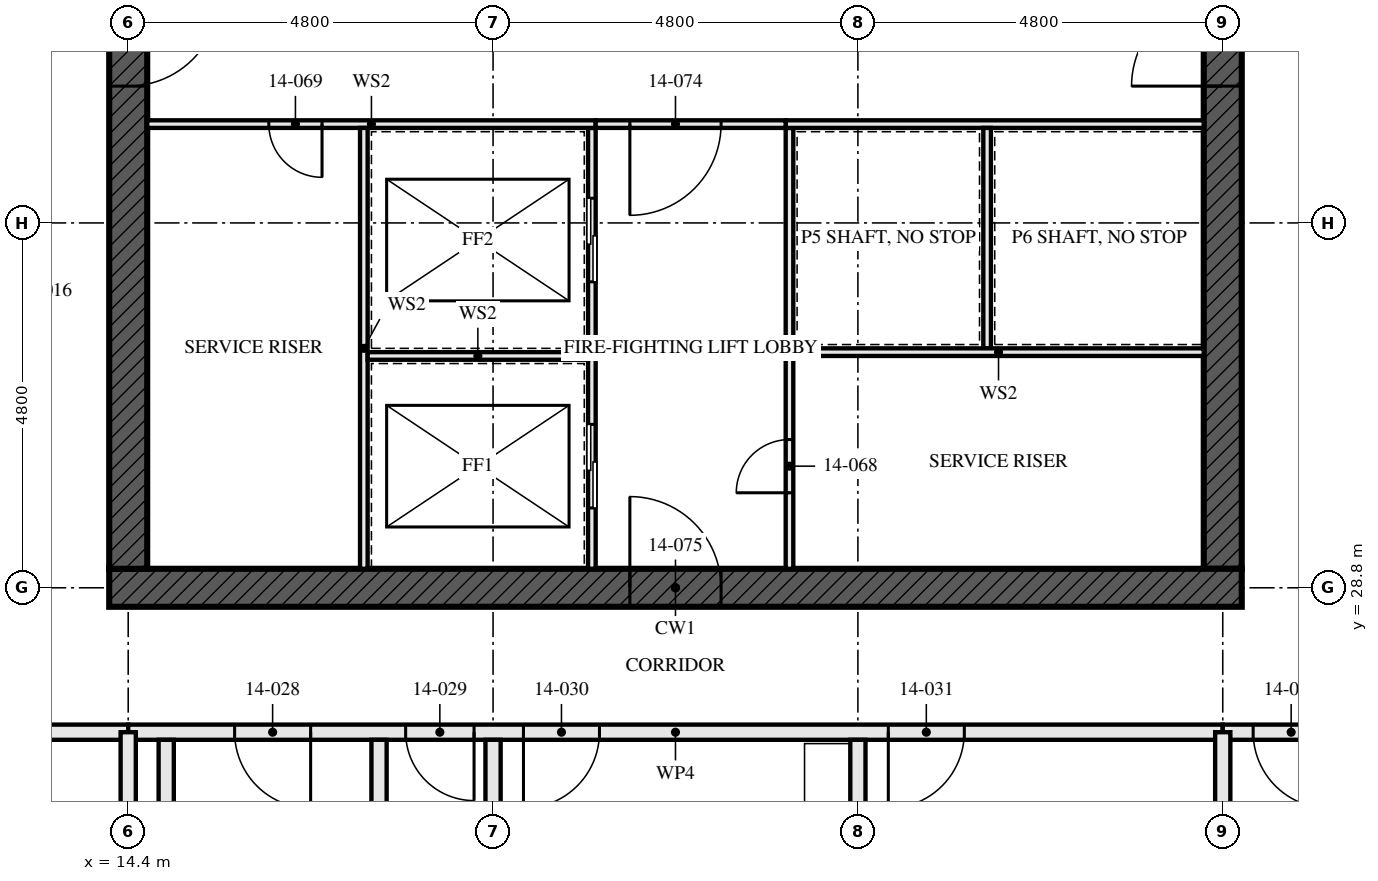
"""IFC4 building model, lengths in metres.
Left out: names, types, materials, properties, quantities, classifications, styles, units other than length and angle.
Written with IfcOpenShell. Run it as: python <this file> out.ifc"""

import sys

from ifc_helpers import new_model, si_unit, direction, frame, frame_2d, origin, place, context, subcontext, project, spatial, rectangle, extrude, element, fill, save


model = new_model("IFC4")
c1 = context("Model", 3, precision=1e-05, world=origin(), true_north=direction((0.0, 1.0)))
c2 = subcontext(c1, "Body", "Model", "MODEL_VIEW")
j1 = project(units=[si_unit("LENGTHUNIT", "METRE"), si_unit("PLANEANGLEUNIT", "RADIAN")], contexts=[c1])
p1 = place(None, origin())
s1 = spatial("IfcSite", under=j1, at=p1, CompositionType="ELEMENT")
p2 = place(p1, origin())
s2 = spatial("IfcBuilding", under=s1, at=p2, CompositionType="ELEMENT")
p3 = place(p2, frame((0.0, 0.0, 55.0)))
s3 = spatial("IfcBuildingStorey", under=s2, at=p3, CompositionType="ELEMENT", Elevation=55.0)
p4 = place(p3, frame((14.15, 28.8, -0.17), z_axis=(0.0, 0.0, 1.0), x_axis=(1.0, 0.0, 0.0)))
e1 = element("IfcWall", 1, at=p4, inside=s3, PredefinedType="SHEAR", context=c2, shape_type="SweptSolid", body=[
    extrude(rectangle(XDim=14.9, YDim=0.5, at=frame_2d((7.45, 0.0))), origin(), (0.0, 0.0, 1.0), 3.5),
])
p5 = place(p4, frame((6.85, 0.0, 0.17)))
e2 = element("IfcOpeningElement", 2, at=p5, cuts=e1, PredefinedType="OPENING", context=c2, shape_type="SweptSolid", body=[
    extrude(rectangle(XDim=1.2, YDim=2.1, at=frame_2d((0.6, 1.05))), frame((0.0, 0.26, 0.0), z_axis=(0.0, -1.0, 0.0), x_axis=(1.0, 0.0, 0.0)), (0.0, 0.0, 1.0), 0.521),
])
p6 = place(p3, frame((14.4, 42.95, -0.17), z_axis=(0.0, 0.0, 1.0), x_axis=(0.0, -1.0, 0.0)))
e3 = element("IfcWall", 3, at=p6, inside=s3, PredefinedType="SHEAR", context=c2, shape_type="SweptSolid", body=[
    extrude(rectangle(XDim=13.9, YDim=0.5, at=frame_2d((6.95, 0.0))), origin(), (0.0, 0.0, 1.0), 3.5),
])
p7 = place(p6, frame((6.35, 0.0, 0.17)))
e4 = element("IfcOpeningElement", 4, at=p7, cuts=e3, PredefinedType="OPENING", context=c2, shape_type="SweptSolid", body=[
    extrude(rectangle(XDim=1.2, YDim=2.1, at=frame_2d((0.6, 1.05))), frame((0.0, 0.26, 0.0), z_axis=(0.0, -1.0, 0.0), x_axis=(1.0, 0.0, 0.0)), (0.0, 0.0, 1.0), 0.521),
])
p8 = place(p3, frame((28.8, 29.05, -0.17), z_axis=(0.0, 0.0, 1.0), x_axis=(0.0, 1.0, 0.0)))
e5 = element("IfcWall", 5, at=p8, inside=s3, PredefinedType="SHEAR", context=c2, shape_type="SweptSolid", body=[
    extrude(rectangle(XDim=13.9, YDim=0.5, at=frame_2d((6.95, 0.0))), origin(), (0.0, 0.0, 1.0), 3.5),
])
p9 = place(p8, frame((6.35, 0.0, 0.17)))
e6 = element("IfcOpeningElement", 6, at=p9, cuts=e5, PredefinedType="OPENING", context=c2, shape_type="SweptSolid", body=[
    extrude(rectangle(XDim=1.2, YDim=2.1, at=frame_2d((0.6, 1.05))), frame((0.0, 0.26, 0.0), z_axis=(0.0, -1.0, 0.0), x_axis=(1.0, 0.0, 0.0)), (0.0, 0.0, 1.0), 0.521),
])
p10 = place(p3, frame((4.8, 26.9, 0.0), z_axis=(0.0, 0.0, 1.0), x_axis=(1.0, 0.0, 0.0)))
e7 = element("IfcWall", 7, at=p10, inside=s3, PredefinedType="PARTITIONING", context=c2, shape_type="SweptSolid", body=[
    extrude(rectangle(XDim=9.6, YDim=0.2, at=frame_2d((4.8, 0.0))), origin(), (0.0, 0.0, 1.0), 3.33),
])
p11 = place(p10, frame((0.4, 0.0, 0.0)))
e8 = element("IfcOpeningElement", 8, at=p11, cuts=e7, PredefinedType="OPENING", context=c2, shape_type="SweptSolid", body=[
    extrude(rectangle(XDim=1.0, YDim=2.1, at=frame_2d((0.5, 1.05))), frame((0.0, 0.111, 0.0), z_axis=(0.0, -1.0, 0.0), x_axis=(1.0, 0.0, 0.0)), (0.0, 0.0, 1.0), 0.221),
])
for number, where, z_axis, x_axis in (
    (9, (14.9, 22.1, 0.0), (0.0, 0.0, 1.0), (0.0, 1.0, 0.0)),
    (10, (17.7, 22.1, 0.0), (0.0, 0.0, 1.0), (0.0, 1.0, 0.0)),
):
    element("IfcWall", number, at=place(p3, frame(where, z_axis=z_axis, x_axis=x_axis)), inside=s3, PredefinedType="SOLIDWALL", context=c2, shape_type="SweptSolid", body=[
        extrude(rectangle(XDim=4.7, YDim=0.2, at=frame_2d((2.35, 0.0))), origin(), (0.0, 0.0, 1.0), 2.99),
    ])
for number, where, z_axis, x_axis in (
    (11, (19.2, 14.795, 0.0), (0.0, 0.0, 1.0), (0.0, 1.0, 0.0)),
    (12, (24.0, 14.795, 0.0), (0.0, 0.0, 1.0), (0.0, 1.0, 0.0)),
):
    element("IfcWall", number, at=place(p3, frame(where, z_axis=z_axis, x_axis=x_axis)), inside=s3, PredefinedType="PARTITIONING", context=c2, shape_type="SweptSolid", body=[
        extrude(rectangle(XDim=12.005, YDim=0.2, at=frame_2d((6.002, 0.0))), origin(), (0.0, 0.0, 1.0), 2.55),
    ])
p12 = place(p3, frame((14.4, 26.9, 0.0), z_axis=(0.0, 0.0, 1.0), x_axis=(1.0, 0.0, 0.0)))
e13 = element("IfcWall", 13, at=p12, inside=s3, PredefinedType="PARTITIONING", context=c2, shape_type="SweptSolid", body=[
    extrude(rectangle(XDim=14.4, YDim=0.2, at=frame_2d((7.2, 0.0))), origin(), (0.0, 0.0, 1.0), 2.55),
])
p13 = place(p12, frame((1.4, 0.0, 0.0)))
e14 = element("IfcOpeningElement", 14, at=p13, cuts=e13, PredefinedType="OPENING", context=c2, shape_type="SweptSolid", body=[
    extrude(rectangle(XDim=1.0, YDim=2.1, at=frame_2d((0.5, 1.05))), frame((0.0, 0.111, 0.0), z_axis=(0.0, -1.0, 0.0), x_axis=(1.0, 0.0, 0.0)), (0.0, 0.0, 1.0), 0.221),
])
p14 = place(p12, frame((3.65, 0.0, 0.0)))
e15 = element("IfcOpeningElement", 15, at=p14, cuts=e13, PredefinedType="OPENING", context=c2, shape_type="SweptSolid", body=[
    extrude(rectangle(XDim=0.9, YDim=2.1, at=frame_2d((0.45, 1.05))), frame((0.0, 0.111, 0.0), z_axis=(0.0, -1.0, 0.0), x_axis=(1.0, 0.0, 0.0)), (0.0, 0.0, 1.0), 0.221),
])
p15 = place(p12, frame((5.2, 0.0, 0.0)))
e16 = element("IfcOpeningElement", 16, at=p15, cuts=e13, PredefinedType="OPENING", context=c2, shape_type="SweptSolid", body=[
    extrude(rectangle(XDim=1.0, YDim=2.1, at=frame_2d((0.5, 1.05))), frame((0.0, 0.111, 0.0), z_axis=(0.0, -1.0, 0.0), x_axis=(1.0, 0.0, 0.0)), (0.0, 0.0, 1.0), 0.221),
])
p16 = place(p12, frame((10.0, 0.0, 0.0)))
e17 = element("IfcOpeningElement", 17, at=p16, cuts=e13, PredefinedType="OPENING", context=c2, shape_type="SweptSolid", body=[
    extrude(rectangle(XDim=1.0, YDim=2.1, at=frame_2d((0.5, 1.05))), frame((0.0, 0.111, 0.0), z_axis=(0.0, -1.0, 0.0), x_axis=(1.0, 0.0, 0.0)), (0.0, 0.0, 1.0), 0.221),
])
p17 = place(p3, frame((28.8, 26.9, 0.0), z_axis=(0.0, 0.0, 1.0), x_axis=(1.0, 0.0, 0.0)))
e18 = element("IfcWall", 18, at=p17, inside=s3, PredefinedType="PARTITIONING", context=c2, shape_type="SweptSolid", body=[
    extrude(rectangle(XDim=9.6, YDim=0.2, at=frame_2d((4.8, 0.0))), origin(), (0.0, 0.0, 1.0), 3.33),
])
p18 = place(p17, frame((0.4, 0.0, 0.0)))
e19 = element("IfcOpeningElement", 19, at=p18, cuts=e18, PredefinedType="OPENING", context=c2, shape_type="SweptSolid", body=[
    extrude(rectangle(XDim=1.0, YDim=2.1, at=frame_2d((0.5, 1.05))), frame((0.0, 0.111, 0.0), z_axis=(0.0, -1.0, 0.0), x_axis=(1.0, 0.0, 0.0)), (0.0, 0.0, 1.0), 0.221),
])
p19 = place(p3, frame((20.5, 29.05, 0.0), z_axis=(0.0, 0.0, 1.0), x_axis=(0.0, 1.0, 0.0)))
e20 = element("IfcWall", 20, at=p19, inside=s3, PredefinedType="SOLIDWALL", context=c2, shape_type="SweptSolid", body=[
    extrude(rectangle(XDim=5.8, YDim=0.1, at=frame_2d((2.9, 0.0))), origin(), (0.0, 0.0, 1.0), 3.33),
])
p20 = place(p19, frame((0.8, 0.0, 0.0)))
e21 = element("IfcOpeningElement", 21, at=p20, cuts=e20, PredefinedType="OPENING", context=c2, shape_type="SweptSolid", body=[
    extrude(rectangle(XDim=1.1, YDim=2.3, at=frame_2d((0.55, 1.15))), frame((0.0, 0.061, 0.0), z_axis=(0.0, -1.0, 0.0), x_axis=(1.0, 0.0, 0.0)), (0.0, 0.0, 1.0), 0.121),
])
p21 = place(p19, frame((3.775, 0.0, 0.0)))
e22 = element("IfcOpeningElement", 22, at=p21, cuts=e20, PredefinedType="OPENING", context=c2, shape_type="SweptSolid", body=[
    extrude(rectangle(XDim=1.1, YDim=2.3, at=frame_2d((0.55, 1.15))), frame((0.0, 0.061, 0.0), z_axis=(0.0, -1.0, 0.0), x_axis=(1.0, 0.0, 0.0)), (0.0, 0.0, 1.0), 0.121),
])
p22 = place(p3, frame((23.1, 29.05, 0.0), z_axis=(0.0, 0.0, 1.0), x_axis=(0.0, 1.0, 0.0)))
e23 = element("IfcWall", 23, at=p22, inside=s3, PredefinedType="SOLIDWALL", context=c2, shape_type="SweptSolid", body=[
    extrude(rectangle(XDim=5.8, YDim=0.1, at=frame_2d((2.9, 0.0))), origin(), (0.0, 0.0, 1.0), 3.33),
])
p23 = place(p22, frame((1.0, 0.0, 0.0)))
e24 = element("IfcOpeningElement", 24, at=p23, cuts=e23, PredefinedType="OPENING", context=c2, shape_type="SweptSolid", body=[
    extrude(rectangle(XDim=0.7, YDim=2.1, at=frame_2d((0.35, 1.05))), frame((0.0, 0.061, 0.0), z_axis=(0.0, -1.0, 0.0), x_axis=(1.0, 0.0, 0.0)), (0.0, 0.0, 1.0), 0.121),
])
p24 = place(p3, frame((14.65, 34.9, 0.0), z_axis=(0.0, 0.0, 1.0), x_axis=(1.0, 0.0, 0.0)))
e25 = element("IfcWall", 25, at=p24, inside=s3, PredefinedType="SOLIDWALL", context=c2, shape_type="SweptSolid", body=[
    extrude(rectangle(XDim=5.9, YDim=0.1, at=frame_2d((2.95, 0.0))), origin(), (0.0, 0.0, 1.0), 3.33),
])
p25 = place(p24, frame((1.6, 0.0, 0.0)))
e26 = element("IfcOpeningElement", 26, at=p25, cuts=e25, PredefinedType="OPENING", context=c2, shape_type="SweptSolid", body=[
    extrude(rectangle(XDim=0.7, YDim=2.1, at=frame_2d((0.35, 1.05))), frame((0.0, 0.061, 0.0), z_axis=(0.0, -1.0, 0.0), x_axis=(1.0, 0.0, 0.0)), (0.0, 0.0, 1.0), 0.121),
])
p26 = place(p3, frame((23.05, 34.9, 0.0), z_axis=(0.0, 0.0, 1.0), x_axis=(1.0, 0.0, 0.0)))
e27 = element("IfcWall", 27, at=p26, inside=s3, PredefinedType="SOLIDWALL", context=c2, shape_type="SweptSolid", body=[
    extrude(rectangle(XDim=5.5, YDim=0.1, at=frame_2d((2.75, 0.0))), origin(), (0.0, 0.0, 1.0), 3.33),
])
p27 = place(p3, frame((20.55, 34.9, 0.0), z_axis=(0.0, 0.0, 1.0), x_axis=(1.0, 0.0, 0.0)))
e28 = element("IfcWall", 28, at=p27, inside=s3, PredefinedType="SOLIDWALL", context=c2, shape_type="SweptSolid", body=[
    extrude(rectangle(XDim=2.5, YDim=0.1, at=frame_2d((1.25, 0.0))), origin(), (0.0, 0.0, 1.0), 3.33),
])
p28 = place(p27, frame((0.45, 0.0, 0.0)))
e29 = element("IfcOpeningElement", 29, at=p28, cuts=e28, PredefinedType="OPENING", context=c2, shape_type="SweptSolid", body=[
    extrude(rectangle(XDim=1.2, YDim=2.1, at=frame_2d((0.6, 1.05))), frame((0.0, 0.061, 0.0), z_axis=(0.0, -1.0, 0.0), x_axis=(1.0, 0.0, 0.0)), (0.0, 0.0, 1.0), 0.121),
])
p29 = place(p3, frame((17.5, 29.05, 0.0), z_axis=(0.0, 0.0, 1.0), x_axis=(0.0, 1.0, 0.0)))
e30 = element("IfcWall", 30, at=p29, inside=s3, PredefinedType="SOLIDWALL", context=c2, shape_type="SweptSolid", body=[
    extrude(rectangle(XDim=5.8, YDim=0.1, at=frame_2d((2.9, 0.0))), origin(), (0.0, 0.0, 1.0), 3.33),
])
p30 = place(p3, frame((17.55, 31.85, 0.0), z_axis=(0.0, 0.0, 1.0), x_axis=(1.0, 0.0, 0.0)))
e31 = element("IfcWall", 31, at=p30, inside=s3, PredefinedType="SOLIDWALL", context=c2, shape_type="SweptSolid", body=[
    extrude(rectangle(XDim=2.9, YDim=0.1, at=frame_2d((1.45, 0.0))), origin(), (0.0, 0.0, 1.0), 3.33),
])
p31 = place(p3, frame((25.7, 31.95, 0.0), z_axis=(0.0, 0.0, 1.0), x_axis=(0.0, 1.0, 0.0)))
e32 = element("IfcWall", 32, at=p31, inside=s3, PredefinedType="SOLIDWALL", context=c2, shape_type="SweptSolid", body=[
    extrude(rectangle(XDim=2.9, YDim=0.1, at=frame_2d((1.45, 0.0))), origin(), (0.0, 0.0, 1.0), 3.33),
])
p32 = place(p3, frame((23.15, 31.9, 0.0), z_axis=(0.0, 0.0, 1.0), x_axis=(1.0, 0.0, 0.0)))
e33 = element("IfcWall", 33, at=p32, inside=s3, PredefinedType="SOLIDWALL", context=c2, shape_type="SweptSolid", body=[
    extrude(rectangle(XDim=5.4, YDim=0.1, at=frame_2d((2.7, 0.0))), origin(), (0.0, 0.0, 1.0), 3.33),
])
for number, where, z_axis, x_axis in (
    (34, (14.4, 24.395, 0.0), (0.0, 0.0, 1.0), (0.0, 1.0, 0.0)),
    (35, (28.8, 24.395, 0.0), (0.0, 0.0, 1.0), (0.0, 1.0, 0.0)),
):
    element("IfcWall", number, at=place(p3, frame(where, z_axis=z_axis, x_axis=x_axis)), inside=s3, PredefinedType="PARTITIONING", context=c2, shape_type="SweptSolid", body=[
        extrude(rectangle(XDim=2.505, YDim=0.2, at=frame_2d((1.252, 0.0))), origin(), (0.0, 0.0, 1.0), 2.32),
    ])
p33 = place(p13, frame((1.0, 0.0, 0.0), z_axis=(0.0, 0.0, 1.0), x_axis=(-1.0, 0.0, 0.0)))
e36 = element("IfcDoor", 36, at=p33, inside=s3, OperationType="SINGLE_SWING_RIGHT", PredefinedType="DOOR", context=c2, shape_type="SweptSolid", body=[
    extrude(rectangle(XDim=1.0, YDim=2.1, at=frame_2d((0.5, 1.05))), frame((0.0, 0.032, 0.0), z_axis=(0.0, -1.0, 0.0), x_axis=(1.0, 0.0, 0.0)), (0.0, 0.0, 1.0), 0.064),
])
fill(e14, e36)
p34 = place(p14, frame((0.9, 0.0, 0.0), z_axis=(0.0, 0.0, 1.0), x_axis=(-1.0, 0.0, 0.0)))
e37 = element("IfcDoor", 37, at=p34, inside=s3, OperationType="SINGLE_SWING_RIGHT", PredefinedType="DOOR", context=c2, shape_type="SweptSolid", body=[
    extrude(rectangle(XDim=0.9, YDim=2.1, at=frame_2d((0.45, 1.05))), frame((0.0, 0.027, 0.0), z_axis=(0.0, -1.0, 0.0), x_axis=(1.0, 0.0, 0.0)), (0.0, 0.0, 1.0), 0.054),
])
fill(e15, e37)
p35 = place(p15, frame((1.0, 0.0, 0.0), z_axis=(0.0, 0.0, 1.0), x_axis=(-1.0, 0.0, 0.0)))
e38 = element("IfcDoor", 38, at=p35, inside=s3, OperationType="SINGLE_SWING_LEFT", PredefinedType="DOOR", context=c2, shape_type="SweptSolid", body=[
    extrude(rectangle(XDim=1.0, YDim=2.1, at=frame_2d((0.5, 1.05))), frame((0.0, 0.027, 0.0), z_axis=(0.0, -1.0, 0.0), x_axis=(1.0, 0.0, 0.0)), (0.0, 0.0, 1.0), 0.054),
])
fill(e16, e38)
p36 = place(p16, frame((1.0, 0.0, 0.0), z_axis=(0.0, 0.0, 1.0), x_axis=(-1.0, 0.0, 0.0)))
e39 = element("IfcDoor", 39, at=p36, inside=s3, OperationType="SINGLE_SWING_LEFT", PredefinedType="DOOR", context=c2, shape_type="SweptSolid", body=[
    extrude(rectangle(XDim=1.0, YDim=2.1, at=frame_2d((0.5, 1.05))), frame((0.0, 0.027, 0.0), z_axis=(0.0, -1.0, 0.0), x_axis=(1.0, 0.0, 0.0)), (0.0, 0.0, 1.0), 0.054),
])
fill(e17, e39)
p37 = place(p18, frame((1.0, 0.0, 0.0), z_axis=(0.0, 0.0, 1.0), x_axis=(-1.0, 0.0, 0.0)))
e40 = element("IfcDoor", 40, at=p37, inside=s3, OperationType="SINGLE_SWING_RIGHT", PredefinedType="DOOR", context=c2, shape_type="SweptSolid", body=[
    extrude(rectangle(XDim=1.0, YDim=2.1, at=frame_2d((0.5, 1.05))), frame((0.0, 0.027, 0.0), z_axis=(0.0, -1.0, 0.0), x_axis=(1.0, 0.0, 0.0)), (0.0, 0.0, 1.0), 0.054),
])
fill(e19, e40)
p38 = place(p20, origin())
e41 = element("IfcDoor", 41, at=p38, inside=s3, OperationType="SLIDING_TO_LEFT", PredefinedType="DOOR", context=c2, shape_type="SweptSolid", body=[
    extrude(rectangle(XDim=1.1, YDim=2.3, at=frame_2d((0.55, 1.15))), frame((0.0, 0.05, 0.0), z_axis=(0.0, -1.0, 0.0), x_axis=(1.0, 0.0, 0.0)), (0.0, 0.0, 1.0), 0.1),
])
fill(e21, e41)
p39 = place(p21, origin())
e42 = element("IfcDoor", 42, at=p39, inside=s3, OperationType="SLIDING_TO_LEFT", PredefinedType="DOOR", context=c2, shape_type="SweptSolid", body=[
    extrude(rectangle(XDim=1.1, YDim=2.3, at=frame_2d((0.55, 1.15))), frame((0.0, 0.05, 0.0), z_axis=(0.0, -1.0, 0.0), x_axis=(1.0, 0.0, 0.0)), (0.0, 0.0, 1.0), 0.1),
])
fill(e22, e42)
p40 = place(p23, origin())
e43 = element("IfcDoor", 43, at=p40, inside=s3, OperationType="SINGLE_SWING_RIGHT", PredefinedType="DOOR", context=c2, shape_type="SweptSolid", body=[
    extrude(rectangle(XDim=0.7, YDim=2.1, at=frame_2d((0.35, 1.05))), frame((0.0, 0.027, 0.0), z_axis=(0.0, -1.0, 0.0), x_axis=(1.0, 0.0, 0.0)), (0.0, 0.0, 1.0), 0.054),
])
fill(e24, e43)
p41 = place(p25, frame((0.7, 0.0, 0.0), z_axis=(0.0, 0.0, 1.0), x_axis=(-1.0, 0.0, 0.0)))
e44 = element("IfcDoor", 44, at=p41, inside=s3, OperationType="SINGLE_SWING_RIGHT", PredefinedType="DOOR", context=c2, shape_type="SweptSolid", body=[
    extrude(rectangle(XDim=0.7, YDim=2.1, at=frame_2d((0.35, 1.05))), frame((0.0, 0.027, 0.0), z_axis=(0.0, -1.0, 0.0), x_axis=(1.0, 0.0, 0.0)), (0.0, 0.0, 1.0), 0.054),
])
fill(e26, e44)
p42 = place(p28, frame((1.2, 0.0, 0.0), z_axis=(0.0, 0.0, 1.0), x_axis=(-1.0, 0.0, 0.0)))
e45 = element("IfcDoor", 45, at=p42, inside=s3, OperationType="SINGLE_SWING_LEFT", PredefinedType="DOOR", context=c2, shape_type="SweptSolid", body=[
    extrude(rectangle(XDim=1.2, YDim=2.1, at=frame_2d((0.6, 1.05))), frame((0.0, 0.027, 0.0), z_axis=(0.0, -1.0, 0.0), x_axis=(1.0, 0.0, 0.0)), (0.0, 0.0, 1.0), 0.054),
])
fill(e29, e45)
p43 = place(p5, origin())
e46 = element("IfcDoor", 46, at=p43, inside=s3, OperationType="SINGLE_SWING_LEFT", PredefinedType="DOOR", context=c2, shape_type="SweptSolid", body=[
    extrude(rectangle(XDim=1.2, YDim=2.1, at=frame_2d((0.6, 1.05))), frame((0.0, 0.027, 0.0), z_axis=(0.0, -1.0, 0.0), x_axis=(1.0, 0.0, 0.0)), (0.0, 0.0, 1.0), 0.054),
])
fill(e2, e46)
p44 = place(p7, origin())
e47 = element("IfcDoor", 47, at=p44, inside=s3, OperationType="SINGLE_SWING_LEFT", PredefinedType="DOOR", context=c2, shape_type="SweptSolid", body=[
    extrude(rectangle(XDim=1.2, YDim=2.1, at=frame_2d((0.6, 1.05))), frame((0.0, 0.027, 0.0), z_axis=(0.0, -1.0, 0.0), x_axis=(1.0, 0.0, 0.0)), (0.0, 0.0, 1.0), 0.054),
])
fill(e4, e47)
p45 = place(p9, origin())
e48 = element("IfcDoor", 48, at=p45, inside=s3, OperationType="SINGLE_SWING_LEFT", PredefinedType="DOOR", context=c2, shape_type="SweptSolid", body=[
    extrude(rectangle(XDim=1.2, YDim=2.1, at=frame_2d((0.6, 1.05))), frame((0.0, 0.027, 0.0), z_axis=(0.0, -1.0, 0.0), x_axis=(1.0, 0.0, 0.0)), (0.0, 0.0, 1.0), 0.054),
])
fill(e6, e48)
save(model, sys.argv[1])
